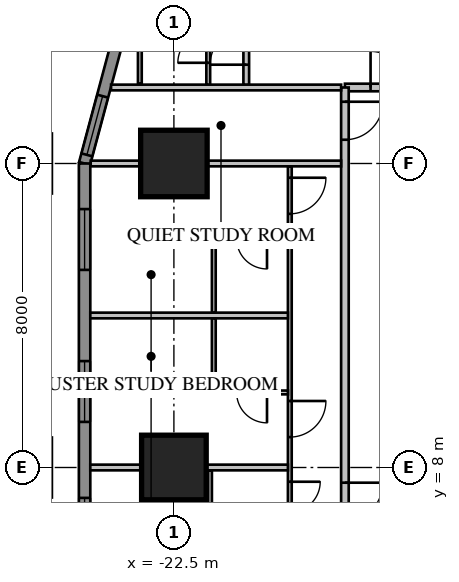
"""IFC4 building model, lengths in metres.
Left out: names, types, materials, properties, quantities, classifications, styles, units other than length and angle.
Written with IfcOpenShell. Run it as: python <this file> out.ifc"""

import sys

from ifc_helpers import new_model, si_unit, direction, frame, frame_2d, origin, origin_2d, place, context, subcontext, project, spatial, rectangle, extrude, element, fill, save


model = new_model("IFC4")
c1 = context("Model", 3, precision=1e-05, world=origin(), true_north=direction((0.0, 1.0)))
c2 = subcontext(c1, "Body", "Model", "MODEL_VIEW")
j1 = project(units=[si_unit("LENGTHUNIT", "METRE"), si_unit("PLANEANGLEUNIT", "RADIAN")], contexts=[c1])
p1 = place(None, origin())
s1 = spatial("IfcSite", under=j1, at=p1, CompositionType="ELEMENT")
p2 = place(p1, origin())
s2 = spatial("IfcBuilding", under=s1, at=p2, CompositionType="ELEMENT")
p3 = place(p2, frame((0.0, 0.0, 35.25)))
s3 = spatial("IfcBuildingStorey", under=s2, at=p3, CompositionType="ELEMENT", Elevation=35.25)
p4 = place(p3, frame((-22.5, 16.0, 0.0), z_axis=(0.0, 0.0, 1.0), x_axis=(1.0, 0.0, 0.0)))
e1 = element("IfcColumn", 1, at=p4, inside=s3, PredefinedType="COLUMN", context=c2, shape_type="SweptSolid", body=[
    extrude(rectangle(XDim=1.75, YDim=1.75, at=origin_2d()), origin(), (0.0, 0.0, 1.0), 3.85),
])
p5 = place(p3, frame((-22.5, 8.0, 0.0), z_axis=(0.0, 0.0, 1.0), x_axis=(1.0, 0.0, 0.0)))
e2 = element("IfcColumn", 2, at=p5, inside=s3, PredefinedType="COLUMN", context=c2, shape_type="SweptSolid", body=[
    extrude(rectangle(XDim=1.7, YDim=1.7, at=origin_2d()), origin(), (0.0, 0.0, 1.0), 3.85),
])
p6 = place(p3, frame((-23.664, 20.425, 0.0), z_axis=(0.0, 0.0, 1.0), x_axis=(-0.258839972501, -0.965920218567, 0.0)))
e3 = element("IfcWall", 3, at=p6, inside=s3, PredefinedType="SOLIDWALL", context=c2, shape_type="SweptSolid", body=[
    extrude(rectangle(XDim=4.581, YDim=0.3, at=frame_2d((2.291, 0.0))), origin(), (0.0, 0.0, 1.0), 3.65),
])
p7 = place(p6, frame((2.746, 0.0, 0.75)))
e4 = element("IfcOpeningElement", 4, at=p7, cuts=e3, PredefinedType="OPENING", context=c2, shape_type="SweptSolid", body=[
    extrude(rectangle(XDim=1.6, YDim=1.8, at=frame_2d((0.8, 0.9))), frame((0.0, 0.17, 0.0), z_axis=(0.0, -1.0, 0.0), x_axis=(1.0, 0.0, 0.0)), (0.0, 0.0, 1.0), 0.34),
])
p8 = place(p3, frame((-24.85, 16.0, 0.0), z_axis=(0.0, 0.0, 1.0), x_axis=(0.0, -1.0, 0.0)))
e5 = element("IfcWall", 5, at=p8, inside=s3, PredefinedType="SOLIDWALL", context=c2, shape_type="SweptSolid", body=[
    extrude(rectangle(XDim=32.0, YDim=0.3, at=frame_2d((16.0, 0.0))), origin(), (0.0, 0.0, 1.0), 3.65),
])
p9 = place(p8, frame((1.2, 0.0, 0.75)))
e6 = element("IfcOpeningElement", 6, at=p9, cuts=e5, PredefinedType="OPENING", context=c2, shape_type="SweptSolid", body=[
    extrude(rectangle(XDim=1.6, YDim=1.8, at=frame_2d((0.8, 0.9))), frame((0.0, 0.17, 0.0), z_axis=(0.0, -1.0, 0.0), x_axis=(1.0, 0.0, 0.0)), (0.0, 0.0, 1.0), 0.34),
])
p10 = place(p8, frame((5.2, 0.0, 0.75)))
e7 = element("IfcOpeningElement", 7, at=p10, cuts=e5, PredefinedType="OPENING", context=c2, shape_type="SweptSolid", body=[
    extrude(rectangle(XDim=1.6, YDim=1.8, at=frame_2d((0.8, 0.9))), frame((0.0, 0.17, 0.0), z_axis=(0.0, -1.0, 0.0), x_axis=(1.0, 0.0, 0.0)), (0.0, 0.0, 1.0), 0.34),
])
p11 = place(p8, frame((17.2, 0.0, 0.75)))
e8 = element("IfcOpeningElement", 8, at=p11, cuts=e5, PredefinedType="OPENING", context=c2, shape_type="SweptSolid", body=[
    extrude(rectangle(XDim=1.6, YDim=1.8, at=frame_2d((0.8, 0.9))), frame((0.0, 0.17, 0.0), z_axis=(0.0, -1.0, 0.0), x_axis=(1.0, 0.0, 0.0)), (0.0, 0.0, 1.0), 0.34),
])
p12 = place(p8, frame((21.2, 0.0, 0.75)))
e9 = element("IfcOpeningElement", 9, at=p12, cuts=e5, PredefinedType="OPENING", context=c2, shape_type="SweptSolid", body=[
    extrude(rectangle(XDim=1.6, YDim=1.8, at=frame_2d((0.8, 0.9))), frame((0.0, 0.17, 0.0), z_axis=(0.0, -1.0, 0.0), x_axis=(1.0, 0.0, 0.0)), (0.0, 0.0, 1.0), 0.34),
])
p13 = place(p8, frame((25.2, 0.0, 0.75)))
e10 = element("IfcOpeningElement", 10, at=p13, cuts=e5, PredefinedType="OPENING", context=c2, shape_type="SweptSolid", body=[
    extrude(rectangle(XDim=1.6, YDim=1.8, at=frame_2d((0.8, 0.9))), frame((0.0, 0.17, 0.0), z_axis=(0.0, -1.0, 0.0), x_axis=(1.0, 0.0, 0.0)), (0.0, 0.0, 1.0), 0.34),
])
p14 = place(p8, frame((29.2, 0.0, 0.75)))
e11 = element("IfcOpeningElement", 11, at=p14, cuts=e5, PredefinedType="OPENING", context=c2, shape_type="SweptSolid", body=[
    extrude(rectangle(XDim=1.6, YDim=1.8, at=frame_2d((0.8, 0.9))), frame((0.0, 0.17, 0.0), z_axis=(0.0, -1.0, 0.0), x_axis=(1.0, 0.0, 0.0)), (0.0, 0.0, 1.0), 0.34),
])
p15 = place(p8, frame((8.8, 0.0, 0.75)))
e12 = element("IfcOpeningElement", 12, at=p15, cuts=e5, PredefinedType="OPENING", context=c2, shape_type="SweptSolid", body=[
    extrude(rectangle(XDim=2.4, YDim=1.8, at=frame_2d((1.2, 0.9))), frame((0.0, 0.17, 0.0), z_axis=(0.0, -1.0, 0.0), x_axis=(1.0, 0.0, 0.0)), (0.0, 0.0, 1.0), 0.34),
])
p16 = place(p8, frame((13.812, 0.0, 0.0)))
e13 = element("IfcOpeningElement", 13, at=p16, cuts=e5, PredefinedType="OPENING", context=c2, shape_type="SweptSolid", body=[
    extrude(rectangle(XDim=1.0, YDim=2.4, at=frame_2d((0.5, 1.2))), frame((0.0, 0.17, 0.0), z_axis=(0.0, -1.0, 0.0), x_axis=(1.0, 0.0, 0.0)), (0.0, 0.0, 1.0), 0.34),
])
p17 = place(p3, frame((18.0, 18.0, 0.0), z_axis=(0.0, 0.0, 1.0), x_axis=(-1.0, 0.0, 0.0)))
e14 = element("IfcWall", 14, at=p17, inside=s3, PredefinedType="PARTITIONING", context=c2, shape_type="SweptSolid", body=[
    extrude(rectangle(XDim=36.0, YDim=0.2, at=frame_2d((18.0, 0.0))), origin(), (0.0, 0.0, 1.0), 3.65),
])
p18 = place(p17, frame((10.4, 0.0, 0.0)))
e15 = element("IfcOpeningElement", 15, at=p18, cuts=e14, PredefinedType="OPENING", context=c2, shape_type="SweptSolid", body=[
    extrude(rectangle(XDim=1.0, YDim=2.1, at=frame_2d((0.5, 1.05))), frame((0.0, 0.12, 0.0), z_axis=(0.0, -1.0, 0.0), x_axis=(1.0, 0.0, 0.0)), (0.0, 0.0, 1.0), 0.24),
])
p19 = place(p17, frame((0.375, 0.0, 0.0)))
e16 = element("IfcOpeningElement", 16, at=p19, cuts=e14, PredefinedType="OPENING", context=c2, shape_type="SweptSolid", body=[
    extrude(rectangle(XDim=1.0, YDim=2.1, at=frame_2d((0.5, 1.05))), frame((0.0, 0.12, 0.0), z_axis=(0.0, -1.0, 0.0), x_axis=(1.0, 0.0, 0.0)), (0.0, 0.0, 1.0), 0.24),
])
p20 = place(p17, frame((34.375, 0.0, 0.0)))
e17 = element("IfcOpeningElement", 17, at=p20, cuts=e14, PredefinedType="OPENING", context=c2, shape_type="SweptSolid", body=[
    extrude(rectangle(XDim=0.95, YDim=2.1, at=frame_2d((0.475, 1.05))), frame((0.0, 0.12, 0.0), z_axis=(0.0, -1.0, 0.0), x_axis=(1.0, 0.0, 0.0)), (0.0, 0.0, 1.0), 0.24),
])
p21 = place(p3, frame((-21.596, 18.065, 0.0), z_axis=(0.0, 0.0, 1.0), x_axis=(0.0, 1.0, 0.0)))
e18 = element("IfcWall", 18, at=p21, inside=s3, PredefinedType="PARTITIONING", context=c2, shape_type="SweptSolid", body=[
    extrude(rectangle(XDim=2.335, YDim=0.1, at=frame_2d((1.167, 0.0))), origin(), (0.0, 0.0, 1.0), 3.65),
])
p22 = place(p21, frame((0.585, 0.0, 0.0)))
e19 = element("IfcOpeningElement", 19, at=p22, cuts=e18, PredefinedType="OPENING", context=c2, shape_type="SweptSolid", body=[
    extrude(rectangle(XDim=0.8, YDim=2.1, at=frame_2d((0.4, 1.05))), frame((0.0, 0.07, 0.0), z_axis=(0.0, -1.0, 0.0), x_axis=(1.0, 0.0, 0.0)), (0.0, 0.0, 1.0), 0.14),
])
p23 = place(p3, frame((-23.396, 18.1, 0.0), z_axis=(0.0, 0.0, 1.0), x_axis=(0.0, 1.0, 0.0)))
e20 = element("IfcWall", 20, at=p23, inside=s3, PredefinedType="PARTITIONING", context=c2, shape_type="SweptSolid", body=[
    extrude(rectangle(XDim=2.3, YDim=0.1, at=frame_2d((1.15, 0.0))), origin(), (0.0, 0.0, 1.0), 3.65),
])
p24 = place(p3, frame((-20.596, 18.065, 0.0), z_axis=(0.0, 0.0, 1.0), x_axis=(0.0, 1.0, 0.0)))
e21 = element("IfcWall", 21, at=p24, inside=s3, PredefinedType="PARTITIONING", context=c2, shape_type="SweptSolid", body=[
    extrude(rectangle(XDim=5.209, YDim=0.15, at=frame_2d((2.604, 0.0))), origin(), (0.0, 0.0, 1.0), 3.65),
])
p25 = place(p24, frame((0.535, 0.0, 0.0)))
e22 = element("IfcOpeningElement", 22, at=p25, cuts=e21, PredefinedType="OPENING", context=c2, shape_type="SweptSolid", body=[
    extrude(rectangle(XDim=0.95, YDim=2.1, at=frame_2d((0.475, 1.05))), frame((0.0, 0.095, 0.0), z_axis=(0.0, -1.0, 0.0), x_axis=(1.0, 0.0, 0.0)), (0.0, 0.0, 1.0), 0.19),
])
p26 = place(p3, frame((-18.0, 18.0, 0.0), z_axis=(0.0, 0.0, 1.0), x_axis=(0.0, -1.0, 0.0)))
e23 = element("IfcWall", 23, at=p26, inside=s3, PredefinedType="PARTITIONING", context=c2, shape_type="SweptSolid", body=[
    extrude(rectangle(XDim=36.0, YDim=0.2, at=frame_2d((18.0, 0.0))), origin(), (0.0, 0.0, 1.0), 3.65),
])
p27 = place(p26, frame((10.4, 0.0, 0.0)))
e24 = element("IfcOpeningElement", 24, at=p27, cuts=e23, PredefinedType="OPENING", context=c2, shape_type="SweptSolid", body=[
    extrude(rectangle(XDim=1.0, YDim=2.1, at=frame_2d((0.5, 1.05))), frame((0.0, 0.12, 0.0), z_axis=(0.0, -1.0, 0.0), x_axis=(1.0, 0.0, 0.0)), (0.0, 0.0, 1.0), 0.24),
])
p28 = place(p26, frame((0.375, 0.0, 0.0)))
e25 = element("IfcOpeningElement", 25, at=p28, cuts=e23, PredefinedType="OPENING", context=c2, shape_type="SweptSolid", body=[
    extrude(rectangle(XDim=1.0, YDim=2.1, at=frame_2d((0.5, 1.05))), frame((0.0, 0.12, 0.0), z_axis=(0.0, -1.0, 0.0), x_axis=(1.0, 0.0, 0.0)), (0.0, 0.0, 1.0), 0.24),
])
p29 = place(p26, frame((34.375, 0.0, 0.0)))
e26 = element("IfcOpeningElement", 26, at=p29, cuts=e23, PredefinedType="OPENING", context=c2, shape_type="SweptSolid", body=[
    extrude(rectangle(XDim=0.95, YDim=2.1, at=frame_2d((0.475, 1.05))), frame((0.0, 0.12, 0.0), z_axis=(0.0, -1.0, 0.0), x_axis=(1.0, 0.0, 0.0)), (0.0, 0.0, 1.0), 0.24),
])
p30 = place(p3, frame((-19.45, 15.925, 0.0), z_axis=(0.0, 0.0, 1.0), x_axis=(0.0, -1.0, 0.0)))
e27 = element("IfcWall", 27, at=p30, inside=s3, PredefinedType="PARTITIONING", context=c2, shape_type="SweptSolid", body=[
    extrude(rectangle(XDim=31.85, YDim=0.1, at=frame_2d((15.925, 0.0))), origin(), (0.0, 0.0, 1.0), 3.65),
])
p31 = place(p30, frame((10.125, 0.0, 0.0)))
e28 = element("IfcOpeningElement", 28, at=p31, cuts=e27, PredefinedType="OPENING", context=c2, shape_type="SweptSolid", body=[
    extrude(rectangle(XDim=1.0, YDim=2.1, at=frame_2d((0.5, 1.05))), frame((0.0, 0.07, 0.0), z_axis=(0.0, -1.0, 0.0), x_axis=(1.0, 0.0, 0.0)), (0.0, 0.0, 1.0), 0.14),
])
p32 = place(p30, frame((8.3, 0.0, 0.0)))
e29 = element("IfcOpeningElement", 29, at=p32, cuts=e27, PredefinedType="OPENING", context=c2, shape_type="SweptSolid", body=[
    extrude(rectangle(XDim=0.8, YDim=2.1, at=frame_2d((0.4, 1.05))), frame((0.0, 0.07, 0.0), z_axis=(0.0, -1.0, 0.0), x_axis=(1.0, 0.0, 0.0)), (0.0, 0.0, 1.0), 0.14),
])
p33 = place(p30, frame((0.3, 0.0, 0.0)))
e30 = element("IfcOpeningElement", 30, at=p33, cuts=e27, PredefinedType="OPENING", context=c2, shape_type="SweptSolid", body=[
    extrude(rectangle(XDim=0.95, YDim=2.1, at=frame_2d((0.475, 1.05))), frame((0.0, 0.07, 0.0), z_axis=(0.0, -1.0, 0.0), x_axis=(1.0, 0.0, 0.0)), (0.0, 0.0, 1.0), 0.14),
])
p34 = place(p30, frame((6.175, 0.0, 0.0)))
e31 = element("IfcOpeningElement", 31, at=p34, cuts=e27, PredefinedType="OPENING", context=c2, shape_type="SweptSolid", body=[
    extrude(rectangle(XDim=0.95, YDim=2.1, at=frame_2d((0.475, 1.05))), frame((0.0, 0.07, 0.0), z_axis=(0.0, -1.0, 0.0), x_axis=(1.0, 0.0, 0.0)), (0.0, 0.0, 1.0), 0.14),
])
p35 = place(p30, frame((16.3, 0.0, 0.0)))
e32 = element("IfcOpeningElement", 32, at=p35, cuts=e27, PredefinedType="OPENING", context=c2, shape_type="SweptSolid", body=[
    extrude(rectangle(XDim=0.95, YDim=2.1, at=frame_2d((0.475, 1.05))), frame((0.0, 0.07, 0.0), z_axis=(0.0, -1.0, 0.0), x_axis=(1.0, 0.0, 0.0)), (0.0, 0.0, 1.0), 0.14),
])
p36 = place(p30, frame((22.175, 0.0, 0.0)))
e33 = element("IfcOpeningElement", 33, at=p36, cuts=e27, PredefinedType="OPENING", context=c2, shape_type="SweptSolid", body=[
    extrude(rectangle(XDim=0.95, YDim=2.1, at=frame_2d((0.475, 1.05))), frame((0.0, 0.07, 0.0), z_axis=(0.0, -1.0, 0.0), x_axis=(1.0, 0.0, 0.0)), (0.0, 0.0, 1.0), 0.14),
])
p37 = place(p30, frame((24.3, 0.0, 0.0)))
e34 = element("IfcOpeningElement", 34, at=p37, cuts=e27, PredefinedType="OPENING", context=c2, shape_type="SweptSolid", body=[
    extrude(rectangle(XDim=0.95, YDim=2.1, at=frame_2d((0.475, 1.05))), frame((0.0, 0.07, 0.0), z_axis=(0.0, -1.0, 0.0), x_axis=(1.0, 0.0, 0.0)), (0.0, 0.0, 1.0), 0.14),
])
p38 = place(p30, frame((30.175, 0.0, 0.0)))
e35 = element("IfcOpeningElement", 35, at=p38, cuts=e27, PredefinedType="OPENING", context=c2, shape_type="SweptSolid", body=[
    extrude(rectangle(XDim=0.95, YDim=2.1, at=frame_2d((0.475, 1.05))), frame((0.0, 0.07, 0.0), z_axis=(0.0, -1.0, 0.0), x_axis=(1.0, 0.0, 0.0)), (0.0, 0.0, 1.0), 0.14),
])
p39 = place(p3, frame((-21.55, 7.925, 0.0), z_axis=(0.0, 0.0, 1.0), x_axis=(0.0, -1.0, 0.0)))
e36 = element("IfcWall", 36, at=p39, inside=s3, PredefinedType="PARTITIONING", context=c2, shape_type="SweptSolid", body=[
    extrude(rectangle(XDim=1.7, YDim=0.1, at=frame_2d((0.85, 0.0))), origin(), (0.0, 0.0, 1.0), 3.65),
])
p40 = place(p3, frame((-18.1, 18.0, 0.0), z_axis=(0.0, 0.0, 1.0), x_axis=(-1.0, 0.0, 0.0)))
e37 = element("IfcWall", 37, at=p40, inside=s3, PredefinedType="PARTITIONING", context=c2, shape_type="SweptSolid", body=[
    extrude(rectangle(XDim=6.053, YDim=0.15, at=frame_2d((3.027, 0.0))), origin(), (0.0, 0.0, 1.0), 3.65),
])
p41 = place(p3, frame((-18.1, 16.0, 0.0), z_axis=(0.0, 0.0, 1.0), x_axis=(-1.0, 0.0, 0.0)))
e38 = element("IfcWall", 38, at=p41, inside=s3, PredefinedType="PARTITIONING", context=c2, shape_type="SweptSolid", body=[
    extrude(rectangle(XDim=6.589, YDim=0.15, at=frame_2d((3.295, 0.0))), origin(), (0.0, 0.0, 1.0), 3.65),
])
for number, where, z_axis, x_axis in (
    (39, (-19.5, 12.0, 0.0), (0.0, 0.0, 1.0), (-1.0, 0.0, 0.0)),
    (40, (-19.5, 8.0, 0.0), (0.0, 0.0, 1.0), (-1.0, 0.0, 0.0)),
):
    element("IfcWall", number, at=place(p3, frame(where, z_axis=z_axis, x_axis=x_axis)), inside=s3, PredefinedType="PARTITIONING", context=c2, shape_type="SweptSolid", body=[
        extrude(rectangle(XDim=5.2, YDim=0.15, at=frame_2d((2.6, 0.0))), origin(), (0.0, 0.0, 1.0), 3.65),
    ])
p42 = place(p3, frame((-19.5, 14.025, 0.0), z_axis=(0.0, 0.0, 1.0), x_axis=(-1.0, 0.0, 0.0)))
e41 = element("IfcWall", 41, at=p42, inside=s3, PredefinedType="PARTITIONING", context=c2, shape_type="SweptSolid", body=[
    extrude(rectangle(XDim=2.0, YDim=0.1, at=frame_2d((1.0, 0.0))), origin(), (0.0, 0.0, 1.0), 3.65),
])
p43 = place(p42, frame((0.55, 0.0, 0.0)))
e42 = element("IfcOpeningElement", 42, at=p43, cuts=e41, PredefinedType="OPENING", context=c2, shape_type="SweptSolid", body=[
    extrude(rectangle(XDim=0.8, YDim=2.1, at=frame_2d((0.4, 1.05))), frame((0.0, 0.07, 0.0), z_axis=(0.0, -1.0, 0.0), x_axis=(1.0, 0.0, 0.0)), (0.0, 0.0, 1.0), 0.14),
])
p44 = place(p3, frame((-21.45, 13.975, 0.0), z_axis=(0.0, 0.0, 1.0), x_axis=(0.0, -1.0, 0.0)))
e43 = element("IfcWall", 43, at=p44, inside=s3, PredefinedType="PARTITIONING", context=c2, shape_type="SweptSolid", body=[
    extrude(rectangle(XDim=1.9, YDim=0.1, at=frame_2d((0.95, 0.0))), origin(), (0.0, 0.0, 1.0), 3.65),
])
p45 = place(p3, frame((-19.5, 9.975, 0.0), z_axis=(0.0, 0.0, 1.0), x_axis=(-1.0, 0.0, 0.0)))
e44 = element("IfcWall", 44, at=p45, inside=s3, PredefinedType="PARTITIONING", context=c2, shape_type="SweptSolid", body=[
    extrude(rectangle(XDim=2.0, YDim=0.1, at=frame_2d((1.0, 0.0))), origin(), (0.0, 0.0, 1.0), 3.65),
])
p46 = place(p45, frame((0.55, 0.0, 0.0)))
e45 = element("IfcOpeningElement", 45, at=p46, cuts=e44, PredefinedType="OPENING", context=c2, shape_type="SweptSolid", body=[
    extrude(rectangle(XDim=0.8, YDim=2.1, at=frame_2d((0.4, 1.05))), frame((0.0, 0.07, 0.0), z_axis=(0.0, -1.0, 0.0), x_axis=(1.0, 0.0, 0.0)), (0.0, 0.0, 1.0), 0.14),
])
p47 = place(p3, frame((-21.45, 11.925, 0.0), z_axis=(0.0, 0.0, 1.0), x_axis=(0.0, -1.0, 0.0)))
e46 = element("IfcWall", 46, at=p47, inside=s3, PredefinedType="PARTITIONING", context=c2, shape_type="SweptSolid", body=[
    extrude(rectangle(XDim=1.9, YDim=0.1, at=frame_2d((0.95, 0.0))), origin(), (0.0, 0.0, 1.0), 3.65),
])
p48 = place(p7, origin())
e47 = element("IfcWindow", 47, at=p48, inside=s3, PartitioningType="SINGLE_PANEL", PredefinedType="WINDOW", context=c2, shape_type="SweptSolid", body=[
    extrude(rectangle(XDim=1.6, YDim=1.8, at=frame_2d((0.8, 0.9))), frame((0.0, 0.03, 0.0), z_axis=(0.0, -1.0, 0.0), x_axis=(1.0, 0.0, 0.0)), (0.0, 0.0, 1.0), 0.06),
])
fill(e4, e47)
p49 = place(p9, origin())
e48 = element("IfcWindow", 48, at=p49, inside=s3, PartitioningType="SINGLE_PANEL", PredefinedType="WINDOW", context=c2, shape_type="SweptSolid", body=[
    extrude(rectangle(XDim=1.6, YDim=1.8, at=frame_2d((0.8, 0.9))), frame((0.0, 0.03, 0.0), z_axis=(0.0, -1.0, 0.0), x_axis=(1.0, 0.0, 0.0)), (0.0, 0.0, 1.0), 0.06),
])
fill(e6, e48)
p50 = place(p10, origin())
e49 = element("IfcWindow", 49, at=p50, inside=s3, PartitioningType="SINGLE_PANEL", PredefinedType="WINDOW", context=c2, shape_type="SweptSolid", body=[
    extrude(rectangle(XDim=1.6, YDim=1.8, at=frame_2d((0.8, 0.9))), frame((0.0, 0.03, 0.0), z_axis=(0.0, -1.0, 0.0), x_axis=(1.0, 0.0, 0.0)), (0.0, 0.0, 1.0), 0.06),
])
fill(e7, e49)
p51 = place(p15, origin())
e50 = element("IfcWindow", 50, at=p51, inside=s3, PartitioningType="SINGLE_PANEL", PredefinedType="WINDOW", context=c2, shape_type="SweptSolid", body=[
    extrude(rectangle(XDim=2.4, YDim=1.8, at=frame_2d((1.2, 0.9))), frame((0.0, 0.03, 0.0), z_axis=(0.0, -1.0, 0.0), x_axis=(1.0, 0.0, 0.0)), (0.0, 0.0, 1.0), 0.06),
])
fill(e12, e50)
p52 = place(p20, origin())
e51 = element("IfcDoor", 51, at=p52, inside=s3, OperationType="SINGLE_SWING_RIGHT", PredefinedType="DOOR", context=c2, shape_type="SweptSolid", body=[
    extrude(rectangle(XDim=0.95, YDim=2.1, at=frame_2d((0.475, 1.05))), frame((0.0, 0.025, 0.0), z_axis=(0.0, -1.0, 0.0), x_axis=(1.0, 0.0, 0.0)), (0.0, 0.0, 1.0), 0.05),
])
fill(e17, e51)
p53 = place(p22, origin())
e52 = element("IfcDoor", 52, at=p53, inside=s3, OperationType="SINGLE_SWING_LEFT", PredefinedType="DOOR", context=c2, shape_type="SweptSolid", body=[
    extrude(rectangle(XDim=0.8, YDim=2.1, at=frame_2d((0.4, 1.05))), frame((0.0, 0.025, 0.0), z_axis=(0.0, -1.0, 0.0), x_axis=(1.0, 0.0, 0.0)), (0.0, 0.0, 1.0), 0.05),
])
fill(e19, e52)
p54 = place(p25, origin())
e53 = element("IfcDoor", 53, at=p54, inside=s3, OperationType="SINGLE_SWING_LEFT", PredefinedType="DOOR", context=c2, shape_type="SweptSolid", body=[
    extrude(rectangle(XDim=0.95, YDim=2.1, at=frame_2d((0.475, 1.05))), frame((0.0, 0.025, 0.0), z_axis=(0.0, -1.0, 0.0), x_axis=(1.0, 0.0, 0.0)), (0.0, 0.0, 1.0), 0.05),
])
fill(e22, e53)
p55 = place(p27, origin())
e54 = element("IfcDoor", 54, at=p55, inside=s3, OperationType="SINGLE_SWING_LEFT", PredefinedType="DOOR", context=c2, shape_type="SweptSolid", body=[
    extrude(rectangle(XDim=1.0, YDim=2.1, at=frame_2d((0.5, 1.05))), frame((0.0, 0.025, 0.0), z_axis=(0.0, -1.0, 0.0), x_axis=(1.0, 0.0, 0.0)), (0.0, 0.0, 1.0), 0.05),
])
fill(e24, e54)
p56 = place(p32, origin())
e55 = element("IfcDoor", 55, at=p56, inside=s3, OperationType="SINGLE_SWING_LEFT", PredefinedType="DOOR", context=c2, shape_type="SweptSolid", body=[
    extrude(rectangle(XDim=0.8, YDim=2.1, at=frame_2d((0.4, 1.05))), frame((0.0, 0.025, 0.0), z_axis=(0.0, -1.0, 0.0), x_axis=(1.0, 0.0, 0.0)), (0.0, 0.0, 1.0), 0.05),
])
fill(e29, e55)
p57 = place(p28, origin())
e56 = element("IfcDoor", 56, at=p57, inside=s3, OperationType="SINGLE_SWING_LEFT", PredefinedType="DOOR", context=c2, shape_type="SweptSolid", body=[
    extrude(rectangle(XDim=1.0, YDim=2.1, at=frame_2d((0.5, 1.05))), frame((0.0, 0.025, 0.0), z_axis=(0.0, -1.0, 0.0), x_axis=(1.0, 0.0, 0.0)), (0.0, 0.0, 1.0), 0.05),
])
fill(e25, e56)
p58 = place(p33, origin())
e57 = element("IfcDoor", 57, at=p58, inside=s3, OperationType="SINGLE_SWING_LEFT", PredefinedType="DOOR", context=c2, shape_type="SweptSolid", body=[
    extrude(rectangle(XDim=0.95, YDim=2.1, at=frame_2d((0.475, 1.05))), frame((0.0, 0.025, 0.0), z_axis=(0.0, -1.0, 0.0), x_axis=(1.0, 0.0, 0.0)), (0.0, 0.0, 1.0), 0.05),
])
fill(e30, e57)
p59 = place(p43, origin())
e58 = element("IfcDoor", 58, at=p59, inside=s3, OperationType="SINGLE_SWING_LEFT", PredefinedType="DOOR", context=c2, shape_type="SweptSolid", body=[
    extrude(rectangle(XDim=0.8, YDim=2.1, at=frame_2d((0.4, 1.05))), frame((0.0, 0.025, 0.0), z_axis=(0.0, -1.0, 0.0), x_axis=(1.0, 0.0, 0.0)), (0.0, 0.0, 1.0), 0.05),
])
fill(e42, e58)
p60 = place(p34, origin())
e59 = element("IfcDoor", 59, at=p60, inside=s3, OperationType="SINGLE_SWING_LEFT", PredefinedType="DOOR", context=c2, shape_type="SweptSolid", body=[
    extrude(rectangle(XDim=0.95, YDim=2.1, at=frame_2d((0.475, 1.05))), frame((0.0, 0.025, 0.0), z_axis=(0.0, -1.0, 0.0), x_axis=(1.0, 0.0, 0.0)), (0.0, 0.0, 1.0), 0.05),
])
fill(e31, e59)
p61 = place(p46, origin())
e60 = element("IfcDoor", 60, at=p61, inside=s3, OperationType="SINGLE_SWING_LEFT", PredefinedType="DOOR", context=c2, shape_type="SweptSolid", body=[
    extrude(rectangle(XDim=0.8, YDim=2.1, at=frame_2d((0.4, 1.05))), frame((0.0, 0.025, 0.0), z_axis=(0.0, -1.0, 0.0), x_axis=(1.0, 0.0, 0.0)), (0.0, 0.0, 1.0), 0.05),
])
fill(e45, e60)
save(model, sys.argv[1])
